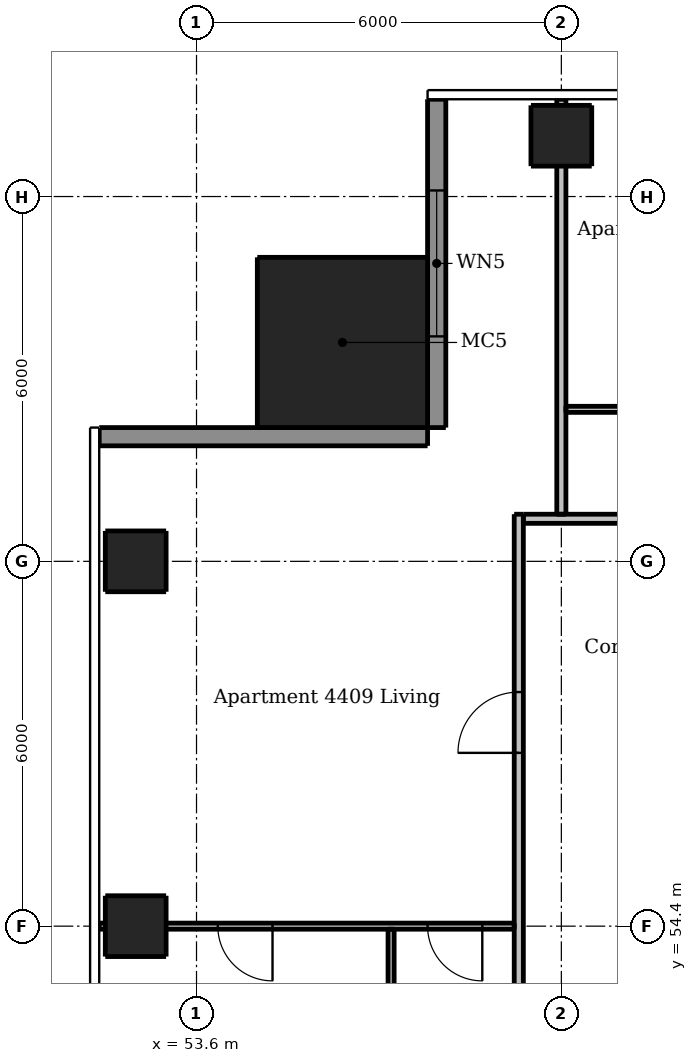
"""IFC4 building model, lengths in metres.
Left out: names, types, materials, properties, quantities, classifications, styles, units other than length and angle.
Written with IfcOpenShell. Run it as: python <this file> out.ifc"""

import sys

from ifc_helpers import new_model, si_unit, direction, frame, frame_2d, origin, origin_2d, place, context, subcontext, project, spatial, rectangle, extrude, element, fill, save


model = new_model("IFC4")
c1 = context("Model", 3, precision=1e-05, world=origin(), true_north=direction((0.0, 1.0)))
c2 = subcontext(c1, "Body", "Model", "MODEL_VIEW")
j1 = project(units=[si_unit("LENGTHUNIT", "METRE"), si_unit("PLANEANGLEUNIT", "RADIAN")], contexts=[c1])
p1 = place(None, origin())
s1 = spatial("IfcSite", under=j1, at=p1, CompositionType="ELEMENT")
p2 = place(p1, origin())
s2 = spatial("IfcBuilding", under=s1, at=p2, CompositionType="ELEMENT")
p3 = place(p2, frame((0.0, 0.0, 164.8)))
s3 = spatial("IfcBuildingStorey", under=s2, at=p3, CompositionType="ELEMENT", Elevation=164.8)
for number, where, z_axis, x_axis in (
    (1, (59.6, 67.4, 0.0), (0.0, 0.0, 1.0), (1.0, 0.0, 0.0)),
    (2, (52.6, 54.4, 0.0), (0.0, 0.0, 1.0), (1.0, 0.0, 0.0)),
    (3, (52.6, 60.4, 0.0), (0.0, 0.0, 1.0), (1.0, 0.0, 0.0)),
):
    element("IfcColumn", number, at=place(p3, frame(where, z_axis=z_axis, x_axis=x_axis)), inside=s3, PredefinedType="COLUMN", context=c2, shape_type="SweptSolid", body=[
        extrude(rectangle(XDim=1.0, YDim=1.0, at=origin_2d()), origin(), (0.0, 0.0, 1.0), 3.05),
    ])
p4 = place(p3, frame((56.0, 64.0, 0.0), z_axis=(0.0, 0.0, 1.0), x_axis=(1.0, 0.0, 0.0)))
e4 = element("IfcColumn", 4, at=p4, inside=s3, PredefinedType="COLUMN", context=c2, shape_type="SweptSolid", body=[
    extrude(rectangle(XDim=2.8, YDim=2.8, at=origin_2d()), origin(), (0.0, 0.0, 1.0), 3.3),
])
p5 = place(p3, frame((57.55, 68.0, 0.0), z_axis=(0.0, 0.0, 1.0), x_axis=(0.0, -1.0, 0.0)))
e5 = element("IfcWall", 5, at=p5, inside=s3, PredefinedType="SOLIDWALL", context=c2, shape_type="SweptSolid", body=[
    extrude(rectangle(XDim=5.4, YDim=0.3, at=frame_2d((2.7, 0.0))), origin(), (0.0, 0.0, 1.0), 3.05),
])
p6 = place(p5, frame((1.5, 0.0, 0.15)))
e6 = element("IfcOpeningElement", 6, at=p6, cuts=e5, PredefinedType="OPENING", context=c2, shape_type="SweptSolid", body=[
    extrude(rectangle(XDim=2.4, YDim=2.1, at=frame_2d((1.2, 1.05))), frame((0.0, 0.16, 0.0), z_axis=(0.0, -1.0, 0.0), x_axis=(1.0, 0.0, 0.0)), (0.0, 0.0, 1.0), 0.32),
])
p7 = place(p3, frame((57.4, 62.45, 0.0), z_axis=(0.0, 0.0, 1.0), x_axis=(-1.0, 0.0, 0.0)))
e7 = element("IfcWall", 7, at=p7, inside=s3, PredefinedType="SOLIDWALL", context=c2, shape_type="SweptSolid", body=[
    extrude(rectangle(XDim=5.4, YDim=0.3, at=frame_2d((2.7, 0.0))), origin(), (0.0, 0.0, 1.0), 3.05),
])
p8 = place(p3, frame((56.8, 54.35, 0.0), z_axis=(0.0, 0.0, 1.0), x_axis=(0.0, -1.0, 0.0)))
e8 = element("IfcWall", 8, at=p8, inside=s3, PredefinedType="PARTITIONING", context=c2, shape_type="SweptSolid", body=[
    extrude(rectangle(XDim=5.875, YDim=0.1, at=frame_2d((2.938, 0.0))), origin(), (0.0, 0.0, 1.0), 3.05),
])
p9 = place(p8, frame((3.75, 0.0, 0.0)))
e9 = element("IfcOpeningElement", 9, at=p9, cuts=e8, PredefinedType="OPENING", context=c2, shape_type="SweptSolid", body=[
    extrude(rectangle(XDim=0.8, YDim=2.1, at=frame_2d((0.4, 1.05))), frame((0.0, 0.06, 0.0), z_axis=(0.0, -1.0, 0.0), x_axis=(1.0, 0.0, 0.0)), (0.0, 0.0, 1.0), 0.12),
])
p10 = place(p3, frame((59.675, 62.9, 0.0), z_axis=(0.0, 0.0, 1.0), x_axis=(1.0, 0.0, 0.0)))
e10 = element("IfcWall", 10, at=p10, inside=s3, PredefinedType="PARTITIONING", context=c2, shape_type="SweptSolid", body=[
    extrude(rectangle(XDim=17.85, YDim=0.1, at=frame_2d((8.925, 0.0))), origin(), (0.0, 0.0, 1.0), 3.05),
])
p11 = place(p10, frame((12.375, 0.0, 0.0)))
e11 = element("IfcOpeningElement", 11, at=p11, cuts=e10, PredefinedType="OPENING", context=c2, shape_type="SweptSolid", body=[
    extrude(rectangle(XDim=0.9, YDim=2.1, at=frame_2d((0.45, 1.05))), frame((0.0, 0.06, 0.0), z_axis=(0.0, -1.0, 0.0), x_axis=(1.0, 0.0, 0.0)), (0.0, 0.0, 1.0), 0.12),
])
p12 = place(p10, frame((16.275, 0.0, 0.0)))
e12 = element("IfcOpeningElement", 12, at=p12, cuts=e10, PredefinedType="OPENING", context=c2, shape_type="SweptSolid", body=[
    extrude(rectangle(XDim=0.9, YDim=2.1, at=frame_2d((0.45, 1.05))), frame((0.0, 0.06, 0.0), z_axis=(0.0, -1.0, 0.0), x_axis=(1.0, 0.0, 0.0)), (0.0, 0.0, 1.0), 0.12),
])
p13 = place(p10, frame((14.175, 0.0, 0.0)))
e13 = element("IfcOpeningElement", 13, at=p13, cuts=e10, PredefinedType="OPENING", context=c2, shape_type="SweptSolid", body=[
    extrude(rectangle(XDim=0.9, YDim=2.1, at=frame_2d((0.45, 1.05))), frame((0.0, 0.06, 0.0), z_axis=(0.0, -1.0, 0.0), x_axis=(1.0, 0.0, 0.0)), (0.0, 0.0, 1.0), 0.12),
])
p14 = place(p10, frame((1.275, 0.0, 0.0)))
e14 = element("IfcOpeningElement", 14, at=p14, cuts=e10, PredefinedType="OPENING", context=c2, shape_type="SweptSolid", body=[
    extrude(rectangle(XDim=0.9, YDim=2.1, at=frame_2d((0.45, 1.05))), frame((0.0, 0.06, 0.0), z_axis=(0.0, -1.0, 0.0), x_axis=(1.0, 0.0, 0.0)), (0.0, 0.0, 1.0), 0.12),
])
p15 = place(p10, frame((7.275, 0.0, 0.0)))
e15 = element("IfcOpeningElement", 15, at=p15, cuts=e10, PredefinedType="OPENING", context=c2, shape_type="SweptSolid", body=[
    extrude(rectangle(XDim=0.9, YDim=2.1, at=frame_2d((0.45, 1.05))), frame((0.0, 0.06, 0.0), z_axis=(0.0, -1.0, 0.0), x_axis=(1.0, 0.0, 0.0)), (0.0, 0.0, 1.0), 0.12),
])
p16 = place(p10, frame((4.325, 0.0, 0.0)))
e16 = element("IfcOpeningElement", 16, at=p16, cuts=e10, PredefinedType="OPENING", context=c2, shape_type="SweptSolid", body=[
    extrude(rectangle(XDim=0.8, YDim=2.1, at=frame_2d((0.4, 1.05))), frame((0.0, 0.06, 0.0), z_axis=(0.0, -1.0, 0.0), x_axis=(1.0, 0.0, 0.0)), (0.0, 0.0, 1.0), 0.12),
])
p17 = place(p10, frame((10.325, 0.0, 0.0)))
e17 = element("IfcOpeningElement", 17, at=p17, cuts=e10, PredefinedType="OPENING", context=c2, shape_type="SweptSolid", body=[
    extrude(rectangle(XDim=0.8, YDim=2.1, at=frame_2d((0.4, 1.05))), frame((0.0, 0.06, 0.0), z_axis=(0.0, -1.0, 0.0), x_axis=(1.0, 0.0, 0.0)), (0.0, 0.0, 1.0), 0.12),
])
p18 = place(p3, frame((58.825, 54.4, 0.0), z_axis=(0.0, 0.0, 1.0), x_axis=(-1.0, 0.0, 0.0)))
e18 = element("IfcWall", 18, at=p18, inside=s3, PredefinedType="PARTITIONING", context=c2, shape_type="SweptSolid", body=[
    extrude(rectangle(XDim=6.825, YDim=0.1, at=frame_2d((3.413, 0.0))), origin(), (0.0, 0.0, 1.0), 2.516),
])
p19 = place(p18, frame((0.525, 0.0, 0.0)))
e19 = element("IfcOpeningElement", 19, at=p19, cuts=e18, PredefinedType="OPENING", context=c2, shape_type="SweptSolid", body=[
    extrude(rectangle(XDim=0.9, YDim=2.1, at=frame_2d((0.45, 1.05))), frame((0.0, 0.06, 0.0), z_axis=(0.0, -1.0, 0.0), x_axis=(1.0, 0.0, 0.0)), (0.0, 0.0, 1.0), 0.12),
])
p20 = place(p18, frame((3.975, 0.0, 0.0)))
e20 = element("IfcOpeningElement", 20, at=p20, cuts=e18, PredefinedType="OPENING", context=c2, shape_type="SweptSolid", body=[
    extrude(rectangle(XDim=0.9, YDim=2.1, at=frame_2d((0.45, 1.05))), frame((0.0, 0.06, 0.0), z_axis=(0.0, -1.0, 0.0), x_axis=(1.0, 0.0, 0.0)), (0.0, 0.0, 1.0), 0.12),
])
p21 = place(p3, frame((58.9, 30.325, 0.0), z_axis=(0.0, 0.0, 1.0), x_axis=(0.0, 1.0, 0.0)))
e21 = element("IfcWall", 21, at=p21, inside=s3, PredefinedType="PARTITIONING", context=c2, shape_type="SweptSolid", body=[
    extrude(rectangle(XDim=30.85, YDim=0.15, at=frame_2d((15.425, 0.0))), origin(), (0.0, 0.0, 1.0), 3.05),
])
p22 = place(p21, frame((9.225, 0.0, 0.0)))
e22 = element("IfcOpeningElement", 22, at=p22, cuts=e21, PredefinedType="OPENING", context=c2, shape_type="SweptSolid", body=[
    extrude(rectangle(XDim=1.0, YDim=2.1, at=frame_2d((0.5, 1.05))), frame((0.0, 0.085, 0.0), z_axis=(0.0, -1.0, 0.0), x_axis=(1.0, 0.0, 0.0)), (0.0, 0.0, 1.0), 0.17),
])
p23 = place(p21, frame((26.925, 0.0, 0.0)))
e23 = element("IfcOpeningElement", 23, at=p23, cuts=e21, PredefinedType="OPENING", context=c2, shape_type="SweptSolid", body=[
    extrude(rectangle(XDim=1.0, YDim=2.1, at=frame_2d((0.5, 1.05))), frame((0.0, 0.085, 0.0), z_axis=(0.0, -1.0, 0.0), x_axis=(1.0, 0.0, 0.0)), (0.0, 0.0, 1.0), 0.17),
])
p24 = place(p3, frame((59.6, 61.175, 0.0), z_axis=(0.0, 0.0, 1.0), x_axis=(0.0, 1.0, 0.0)))
e24 = element("IfcWall", 24, at=p24, inside=s3, PredefinedType="PARTITIONING", context=c2, shape_type="SweptSolid", body=[
    extrude(rectangle(XDim=6.825, YDim=0.15, at=frame_2d((3.413, 0.0))), origin(), (0.0, 0.0, 1.0), 2.51),
])
p25 = place(p3, frame((58.975, 61.1, 0.0), z_axis=(0.0, 0.0, 1.0), x_axis=(1.0, 0.0, 0.0)))
e25 = element("IfcWall", 25, at=p25, inside=s3, PredefinedType="PARTITIONING", context=c2, shape_type="SweptSolid", body=[
    extrude(rectangle(XDim=29.25, YDim=0.15, at=frame_2d((14.625, 0.0))), origin(), (0.0, 0.0, 1.0), 3.05),
])
p26 = place(p25, frame((9.125, 0.0, 0.0)))
e26 = element("IfcOpeningElement", 26, at=p26, cuts=e25, PredefinedType="OPENING", context=c2, shape_type="SweptSolid", body=[
    extrude(rectangle(XDim=1.0, YDim=2.1, at=frame_2d((0.5, 1.05))), frame((0.0, 0.085, 0.0), z_axis=(0.0, -1.0, 0.0), x_axis=(1.0, 0.0, 0.0)), (0.0, 0.0, 1.0), 0.17),
])
p27 = place(p25, frame((26.475, 0.0, 0.0)))
e27 = element("IfcOpeningElement", 27, at=p27, cuts=e25, PredefinedType="OPENING", context=c2, shape_type="SweptSolid", body=[
    extrude(rectangle(XDim=1.0, YDim=2.1, at=frame_2d((0.5, 1.05))), frame((0.0, 0.085, 0.0), z_axis=(0.0, -1.0, 0.0), x_axis=(1.0, 0.0, 0.0)), (0.0, 0.0, 1.0), 0.17),
])
p28 = place(p6, origin())
e28 = element("IfcWindow", 28, at=p28, inside=s3, PartitioningType="DOUBLE_PANEL_VERTICAL", PredefinedType="WINDOW", context=c2, shape_type="SweptSolid", body=[
    extrude(rectangle(XDim=2.4, YDim=2.1, at=frame_2d((1.2, 1.05))), frame((0.0, 0.03, 0.0), z_axis=(0.0, -1.0, 0.0), x_axis=(1.0, 0.0, 0.0)), (0.0, 0.0, 1.0), 0.06),
])
fill(e6, e28)
p29 = place(p23, origin())
e29 = element("IfcDoor", 29, at=p29, inside=s3, OperationType="SINGLE_SWING_LEFT", PredefinedType="DOOR", context=c2, shape_type="SweptSolid", body=[
    extrude(rectangle(XDim=1.0, YDim=2.1, at=frame_2d((0.5, 1.05))), frame((0.0, 0.025, 0.0), z_axis=(0.0, -1.0, 0.0), x_axis=(1.0, 0.0, 0.0)), (0.0, 0.0, 1.0), 0.05),
])
fill(e23, e29)
p30 = place(p19, origin())
e30 = element("IfcDoor", 30, at=p30, inside=s3, OperationType="SINGLE_SWING_LEFT", PredefinedType="DOOR", context=c2, shape_type="SweptSolid", body=[
    extrude(rectangle(XDim=0.9, YDim=2.1, at=frame_2d((0.45, 1.05))), frame((0.0, 0.025, 0.0), z_axis=(0.0, -1.0, 0.0), x_axis=(1.0, 0.0, 0.0)), (0.0, 0.0, 1.0), 0.05),
])
fill(e19, e30)
p31 = place(p20, origin())
e31 = element("IfcDoor", 31, at=p31, inside=s3, OperationType="SINGLE_SWING_LEFT", PredefinedType="DOOR", context=c2, shape_type="SweptSolid", body=[
    extrude(rectangle(XDim=0.9, YDim=2.1, at=frame_2d((0.45, 1.05))), frame((0.0, 0.025, 0.0), z_axis=(0.0, -1.0, 0.0), x_axis=(1.0, 0.0, 0.0)), (0.0, 0.0, 1.0), 0.05),
])
fill(e20, e31)
save(model, sys.argv[1])
